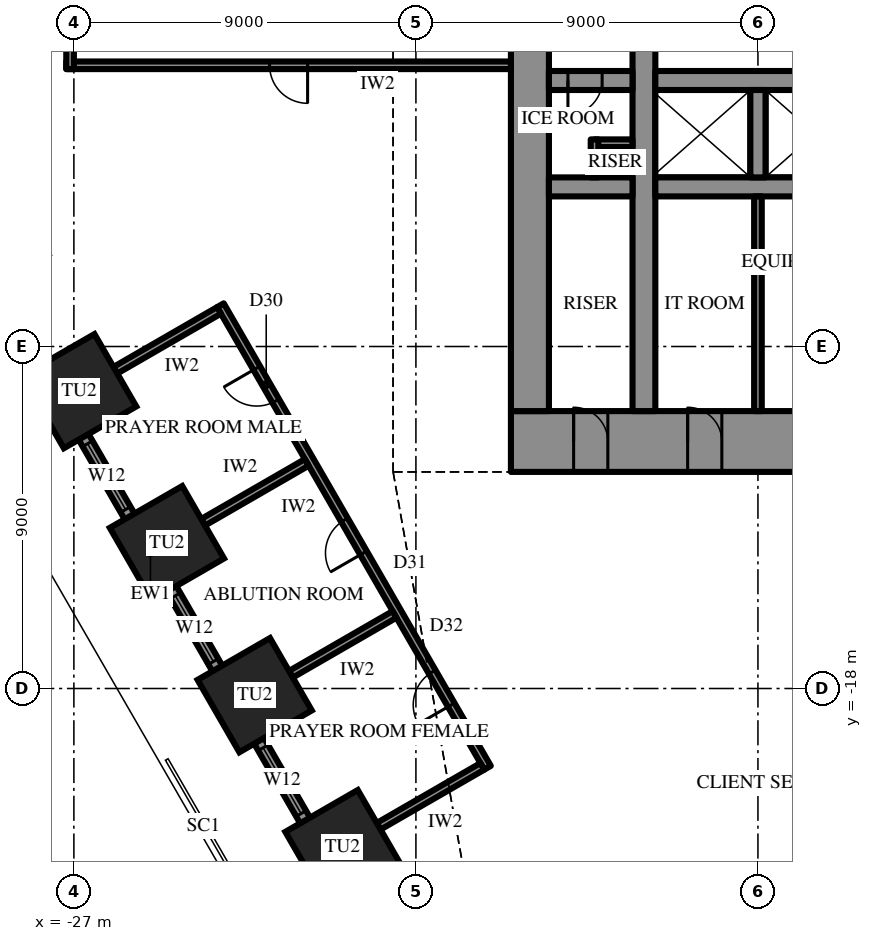
"""IFC4 building model, lengths in metres.
Left out: names, types, materials, properties, quantities, classifications, styles, units other than length and angle.
Written with IfcOpenShell. Run it as: python <this file> out.ifc"""

import sys

from ifc_helpers import new_model, si_unit, direction, frame, frame_2d, origin, origin_2d, place, context, subcontext, project, spatial, rectangle, hollow_rectangle, extrude, element, fill, save


model = new_model("IFC4")
c1 = context("Model", 3, precision=1e-05, world=origin(), true_north=direction((0.0, 1.0)))
c2 = subcontext(c1, "Body", "Model", "MODEL_VIEW")
j1 = project(units=[si_unit("LENGTHUNIT", "METRE"), si_unit("PLANEANGLEUNIT", "RADIAN")], contexts=[c1])
p1 = place(None, origin())
s1 = spatial("IfcSite", under=j1, at=p1, CompositionType="ELEMENT")
p2 = place(p1, origin())
s2 = spatial("IfcBuilding", under=s1, at=p2, CompositionType="ELEMENT")
p3 = place(p2, frame((0.0, 0.0, 215.5)))
s3 = spatial("IfcBuildingStorey", under=s2, at=p3, CompositionType="ELEMENT", Elevation=215.5)
for number, where, z_axis, x_axis in (
    (1, (-26.861, -10.175, 0.0), (0.0, 0.0, 1.0), (0.5, -0.866, 0.0)),
    (2, (-24.552, -14.175, 0.0), (0.0, 0.0, 1.0), (0.5, -0.866, 0.0)),
    (3, (-22.242, -18.175, 0.0), (0.0, 0.0, 1.0), (0.5, -0.866, 0.0)),
    (4, (-19.933, -22.175, 0.0), (0.0, 0.0, 1.0), (0.5, -0.866, 0.0)),
):
    element("IfcColumn", number, at=place(p3, frame(where, z_axis=z_axis, x_axis=x_axis)), inside=s3, PredefinedType="COLUMN", context=c2, shape_type="SweptSolid", body=[
        extrude(hollow_rectangle(XDim=2.2, YDim=2.2, WallThickness=0.12, at=origin_2d()), origin(), (0.0, 0.0, 1.0), 4.2),
    ])
p4 = place(p3, frame((15.5, -11.5, 0.0), z_axis=(0.0, 0.0, 1.0), x_axis=(-1.0, 0.0, 0.0)))
e5 = element("IfcWall", 5, at=p4, inside=s3, PredefinedType="SHEAR", context=c2, shape_type="SweptSolid", body=[
    extrude(rectangle(XDim=31.0, YDim=1.6, at=frame_2d((15.5, 0.0))), origin(), (0.0, 0.0, 1.0), 4.2),
])
p5 = place(p4, frame((16.35, 0.0, 0.0)))
e6 = element("IfcOpeningElement", 6, at=p5, cuts=e5, PredefinedType="OPENING", context=c2, shape_type="SweptSolid", body=[
    extrude(rectangle(XDim=0.9, YDim=2.2, at=frame_2d((0.45, 1.1))), frame((0.0, 0.81, 0.0), z_axis=(0.0, -1.0, 0.0), x_axis=(1.0, 0.0, 0.0)), (0.0, 0.0, 1.0), 1.62),
])
p6 = place(p4, frame((19.35, 0.0, 0.0)))
e7 = element("IfcOpeningElement", 7, at=p6, cuts=e5, PredefinedType="OPENING", context=c2, shape_type="SweptSolid", body=[
    extrude(rectangle(XDim=0.9, YDim=2.2, at=frame_2d((0.45, 1.1))), frame((0.0, 0.81, 0.0), z_axis=(0.0, -1.0, 0.0), x_axis=(1.0, 0.0, 0.0)), (0.0, 0.0, 1.0), 1.62),
])
p7 = place(p4, frame((22.4, 0.0, 0.0)))
e8 = element("IfcOpeningElement", 8, at=p7, cuts=e5, PredefinedType="OPENING", context=c2, shape_type="SweptSolid", body=[
    extrude(rectangle(XDim=1.0, YDim=2.2, at=frame_2d((0.5, 1.1))), frame((0.0, 0.81, 0.0), z_axis=(0.0, -1.0, 0.0), x_axis=(1.0, 0.0, 0.0)), (0.0, 0.0, 1.0), 1.62),
])
p8 = place(p4, frame((1.65, 0.0, 0.0)))
e9 = element("IfcOpeningElement", 9, at=p8, cuts=e5, PredefinedType="OPENING", context=c2, shape_type="SweptSolid", body=[
    extrude(rectangle(XDim=0.9, YDim=2.2, at=frame_2d((0.45, 1.1))), frame((0.0, 0.81, 0.0), z_axis=(0.0, -1.0, 0.0), x_axis=(1.0, 0.0, 0.0)), (0.0, 0.0, 1.0), 1.62),
])
p9 = place(p4, frame((4.65, 0.0, 0.0)))
e10 = element("IfcOpeningElement", 10, at=p9, cuts=e5, PredefinedType="OPENING", context=c2, shape_type="SweptSolid", body=[
    extrude(rectangle(XDim=0.9, YDim=2.2, at=frame_2d((0.45, 1.1))), frame((0.0, 0.81, 0.0), z_axis=(0.0, -1.0, 0.0), x_axis=(1.0, 0.0, 0.0)), (0.0, 0.0, 1.0), 1.62),
])
p10 = place(p4, frame((25.45, 0.0, 0.0)))
e11 = element("IfcOpeningElement", 11, at=p10, cuts=e5, PredefinedType="OPENING", context=c2, shape_type="SweptSolid", body=[
    extrude(rectangle(XDim=0.9, YDim=2.2, at=frame_2d((0.45, 1.1))), frame((0.0, 0.81, 0.0), z_axis=(0.0, -1.0, 0.0), x_axis=(1.0, 0.0, 0.0)), (0.0, 0.0, 1.0), 1.62),
])
p11 = place(p4, frame((28.45, 0.0, 0.0)))
e12 = element("IfcOpeningElement", 12, at=p11, cuts=e5, PredefinedType="OPENING", context=c2, shape_type="SweptSolid", body=[
    extrude(rectangle(XDim=0.9, YDim=2.2, at=frame_2d((0.45, 1.1))), frame((0.0, 0.81, 0.0), z_axis=(0.0, -1.0, 0.0), x_axis=(1.0, 0.0, 0.0)), (0.0, 0.0, 1.0), 1.62),
])
p12 = place(p3, frame((-15.0, 10.7, 0.0), z_axis=(0.0, 0.0, 1.0), x_axis=(0.0, -1.0, 0.0)))
e13 = element("IfcWall", 13, at=p12, inside=s3, PredefinedType="SHEAR", context=c2, shape_type="SweptSolid", body=[
    extrude(rectangle(XDim=21.4, YDim=1.0, at=frame_2d((10.7, 0.0))), origin(), (0.0, 0.0, 1.0), 4.2),
])
p13 = place(p12, frame((9.8, 0.0, 0.0)))
e14 = element("IfcOpeningElement", 14, at=p13, cuts=e13, PredefinedType="OPENING", context=c2, shape_type="SweptSolid", body=[
    extrude(rectangle(XDim=1.8, YDim=2.4, at=frame_2d((0.9, 1.2))), frame((0.0, 0.51, 0.0), z_axis=(0.0, -1.0, 0.0), x_axis=(1.0, 0.0, 0.0)), (0.0, 0.0, 1.0), 1.02),
])
p14 = place(p3, frame((-12.0, -10.7, 0.0), z_axis=(0.0, 0.0, 1.0), x_axis=(0.0, 1.0, 0.0)))
e15 = element("IfcWall", 15, at=p14, inside=s3, PredefinedType="SHEAR", context=c2, shape_type="SweptSolid", body=[
    extrude(rectangle(XDim=21.4, YDim=0.6, at=frame_2d((10.7, 0.0))), origin(), (0.0, 0.0, 1.0), 4.2),
])
p15 = place(p14, frame((9.8, 0.0, 0.0)))
e16 = element("IfcOpeningElement", 16, at=p15, cuts=e15, PredefinedType="OPENING", context=c2, shape_type="SweptSolid", body=[
    extrude(rectangle(XDim=1.8, YDim=2.4, at=frame_2d((0.9, 1.2))), frame((0.0, 0.31, 0.0), z_axis=(0.0, -1.0, 0.0), x_axis=(1.0, 0.0, 0.0)), (0.0, 0.0, 1.0), 0.62),
])
p16 = place(p3, frame((3.2, -2.0, 0.0), z_axis=(0.0, 0.0, 1.0), x_axis=(-1.0, 0.0, 0.0)))
e17 = element("IfcWall", 17, at=p16, inside=s3, PredefinedType="SHEAR", context=c2, shape_type="SweptSolid", body=[
    extrude(rectangle(XDim=14.9, YDim=0.5, at=frame_2d((7.45, 0.0))), origin(), (0.0, 0.0, 1.0), 4.2),
])
p17 = place(p16, frame((1.15, 0.0, 0.0)))
e18 = element("IfcOpeningElement", 18, at=p17, cuts=e17, PredefinedType="OPENING", context=c2, shape_type="SweptSolid", body=[
    extrude(rectangle(XDim=1.1, YDim=2.2, at=frame_2d((0.55, 1.1))), frame((0.0, 0.26, 0.0), z_axis=(0.0, -1.0, 0.0), x_axis=(1.0, 0.0, 0.0)), (0.0, 0.0, 1.0), 0.52),
])
p18 = place(p16, frame((4.15, 0.0, 0.0)))
e19 = element("IfcOpeningElement", 19, at=p18, cuts=e17, PredefinedType="OPENING", context=c2, shape_type="SweptSolid", body=[
    extrude(rectangle(XDim=1.1, YDim=2.2, at=frame_2d((0.55, 1.1))), frame((0.0, 0.26, 0.0), z_axis=(0.0, -1.0, 0.0), x_axis=(1.0, 0.0, 0.0)), (0.0, 0.0, 1.0), 0.52),
])
p19 = place(p16, frame((7.15, 0.0, 0.0)))
e20 = element("IfcOpeningElement", 20, at=p19, cuts=e17, PredefinedType="OPENING", context=c2, shape_type="SweptSolid", body=[
    extrude(rectangle(XDim=1.1, YDim=2.2, at=frame_2d((0.55, 1.1))), frame((0.0, 0.26, 0.0), z_axis=(0.0, -1.0, 0.0), x_axis=(1.0, 0.0, 0.0)), (0.0, 0.0, 1.0), 0.52),
])
p20 = place(p16, frame((10.15, 0.0, 0.0)))
e21 = element("IfcOpeningElement", 21, at=p20, cuts=e17, PredefinedType="OPENING", context=c2, shape_type="SweptSolid", body=[
    extrude(rectangle(XDim=1.1, YDim=2.2, at=frame_2d((0.55, 1.1))), frame((0.0, 0.26, 0.0), z_axis=(0.0, -1.0, 0.0), x_axis=(1.0, 0.0, 0.0)), (0.0, 0.0, 1.0), 0.52),
])
p21 = place(p3, frame((-12.3, -2.0, 0.0), z_axis=(0.0, 0.0, 1.0), x_axis=(-1.0, 0.0, 0.0)))
e22 = element("IfcWall", 22, at=p21, inside=s3, PredefinedType="SHEAR", context=c2, shape_type="SweptSolid", body=[
    extrude(rectangle(XDim=2.2, YDim=0.5, at=frame_2d((1.1, 0.0))), origin(), (0.0, 0.0, 1.0), 4.2),
])
p22 = place(p21, frame((0.8, 0.0, 0.0)))
e23 = element("IfcOpeningElement", 23, at=p22, cuts=e22, PredefinedType="OPENING", context=c2, shape_type="SweptSolid", body=[
    extrude(rectangle(XDim=0.9, YDim=2.2, at=frame_2d((0.45, 1.1))), frame((0.0, 0.26, 0.0), z_axis=(0.0, -1.0, 0.0), x_axis=(1.0, 0.0, 0.0)), (0.0, 0.0, 1.0), 0.52),
])
p23 = place(p3, frame((11.7, -4.8, 0.0), z_axis=(0.0, 0.0, 1.0), x_axis=(-1.0, 0.0, 0.0)))
e24 = element("IfcWall", 24, at=p23, inside=s3, PredefinedType="SHEAR", context=c2, shape_type="SweptSolid", body=[
    extrude(rectangle(XDim=23.4, YDim=0.5, at=frame_2d((11.7, 0.0))), origin(), (0.0, 0.0, 1.0), 4.2),
])
p24 = place(p23, frame((6.6, 0.0, 0.0)))
e25 = element("IfcOpeningElement", 25, at=p24, cuts=e24, PredefinedType="OPENING", context=c2, shape_type="SweptSolid", body=[
    extrude(rectangle(XDim=1.2, YDim=2.2, at=frame_2d((0.6, 1.1))), frame((0.0, 0.26, 0.0), z_axis=(0.0, -1.0, 0.0), x_axis=(1.0, 0.0, 0.0)), (0.0, 0.0, 1.0), 0.52),
])
p25 = place(p23, frame((3.6, 0.0, 0.0)))
e26 = element("IfcOpeningElement", 26, at=p25, cuts=e24, PredefinedType="OPENING", context=c2, shape_type="SweptSolid", body=[
    extrude(rectangle(XDim=1.2, YDim=2.2, at=frame_2d((0.6, 1.1))), frame((0.0, 0.26, 0.0), z_axis=(0.0, -1.0, 0.0), x_axis=(1.0, 0.0, 0.0)), (0.0, 0.0, 1.0), 0.52),
])
p26 = place(p3, frame((-12.3, -4.8, 0.0), z_axis=(0.0, 0.0, 1.0), x_axis=(-1.0, 0.0, 0.0)))
e27 = element("IfcWall", 27, at=p26, inside=s3, PredefinedType="SHEAR", context=c2, shape_type="SweptSolid", body=[
    extrude(rectangle(XDim=2.2, YDim=0.5, at=frame_2d((1.1, 0.0))), origin(), (0.0, 0.0, 1.0), 4.2),
])
p27 = place(p3, frame((-9.0, -2.25, 0.0), z_axis=(0.0, 0.0, 1.0), x_axis=(0.0, -1.0, 0.0)))
e28 = element("IfcWall", 28, at=p27, inside=s3, PredefinedType="SHEAR", context=c2, shape_type="SweptSolid", body=[
    extrude(rectangle(XDim=2.3, YDim=0.4, at=frame_2d((1.15, 0.0))), origin(), (0.0, 0.0, 1.0), 4.2),
])
p28 = place(p3, frame((-31.913, -2.425, 0.0), z_axis=(0.0, 0.0, 1.0), x_axis=(0.500001051461, -0.866024796723, 0.0)))
e29 = element("IfcWall", 29, at=p28, inside=s3, PredefinedType="SOLIDWALL", context=c2, shape_type="SweptSolid", body=[
    extrude(rectangle(XDim=27.713, YDim=0.3, at=frame_2d((13.856, 0.0))), origin(), (0.0, 0.0, 1.0), 2.0),
])
p29 = place(p28, frame((1.309, 0.0, 0.6)))
e30 = element("IfcOpeningElement", 30, at=p29, cuts=e29, PredefinedType="OPENING", context=c2, shape_type="SweptSolid", body=[
    extrude(rectangle(XDim=2.0, YDim=1.15, at=frame_2d((1.0, 0.575))), frame((0.0, 0.16, 0.0), z_axis=(0.0, -1.0, 0.0), x_axis=(1.0, 0.0, 0.0)), (0.0, 0.0, 1.0), 0.32),
])
p30 = place(p28, frame((5.928, 0.0, 0.6)))
e31 = element("IfcOpeningElement", 31, at=p30, cuts=e29, PredefinedType="OPENING", context=c2, shape_type="SweptSolid", body=[
    extrude(rectangle(XDim=2.0, YDim=1.15, at=frame_2d((1.0, 0.575))), frame((0.0, 0.16, 0.0), z_axis=(0.0, -1.0, 0.0), x_axis=(1.0, 0.0, 0.0)), (0.0, 0.0, 1.0), 0.32),
])
p31 = place(p28, frame((10.547, 0.0, 0.6)))
e32 = element("IfcOpeningElement", 32, at=p31, cuts=e29, PredefinedType="OPENING", context=c2, shape_type="SweptSolid", body=[
    extrude(rectangle(XDim=2.0, YDim=1.15, at=frame_2d((1.0, 0.575))), frame((0.0, 0.16, 0.0), z_axis=(0.0, -1.0, 0.0), x_axis=(1.0, 0.0, 0.0)), (0.0, 0.0, 1.0), 0.32),
])
p32 = place(p28, frame((15.166, 0.0, 0.6)))
e33 = element("IfcOpeningElement", 33, at=p32, cuts=e29, PredefinedType="OPENING", context=c2, shape_type="SweptSolid", body=[
    extrude(rectangle(XDim=2.0, YDim=1.15, at=frame_2d((1.0, 0.575))), frame((0.0, 0.16, 0.0), z_axis=(0.0, -1.0, 0.0), x_axis=(1.0, 0.0, 0.0)), (0.0, 0.0, 1.0), 0.32),
])
p33 = place(p28, frame((19.785, 0.0, 0.6)))
e34 = element("IfcOpeningElement", 34, at=p33, cuts=e29, PredefinedType="OPENING", context=c2, shape_type="SweptSolid", body=[
    extrude(rectangle(XDim=2.0, YDim=1.15, at=frame_2d((1.0, 0.575))), frame((0.0, 0.16, 0.0), z_axis=(0.0, -1.0, 0.0), x_axis=(1.0, 0.0, 0.0)), (0.0, 0.0, 1.0), 0.32),
])
p34 = place(p28, frame((24.403, 0.0, 0.6)))
e35 = element("IfcOpeningElement", 35, at=p34, cuts=e29, PredefinedType="OPENING", context=c2, shape_type="SweptSolid", body=[
    extrude(rectangle(XDim=2.0, YDim=1.15, at=frame_2d((1.0, 0.575))), frame((0.0, 0.16, 0.0), z_axis=(0.0, -1.0, 0.0), x_axis=(1.0, 0.0, 0.0)), (0.0, 0.0, 1.0), 0.32),
])
p35 = place(p3, frame((-9.0, -5.05, 0.0), z_axis=(0.0, 0.0, 1.0), x_axis=(0.0, -1.0, 0.0)))
e36 = element("IfcWall", 36, at=p35, inside=s3, PredefinedType="PARTITIONING", context=c2, shape_type="SweptSolid", body=[
    extrude(rectangle(XDim=5.65, YDim=0.2, at=frame_2d((2.825, 0.0))), origin(), (0.0, 0.0, 1.0), 4.0),
])
for number, where, z_axis, x_axis in (
    (37, (-12.3, -3.65, 0.0), (0.0, 0.0, 1.0), (-1.0, 0.0, 0.0)),
    (38, (-13.3, -3.55, 0.0), (0.0, 0.0, 1.0), (0.0, -1.0, 0.0)),
):
    element("IfcWall", number, at=place(p3, frame(where, z_axis=z_axis, x_axis=x_axis)), inside=s3, PredefinedType="PARTITIONING", context=c2, shape_type="SweptSolid", body=[
        extrude(rectangle(XDim=1.0, YDim=0.2, at=frame_2d((0.5, 0.0))), origin(), (0.0, 0.0, 1.0), 4.0),
    ])
p36 = place(p3, frame((-23.144, -7.913, 0.0), z_axis=(0.0, 0.0, 1.0), x_axis=(0.500002095642, -0.866024193862, 0.0)))
e39 = element("IfcWall", 39, at=p36, inside=s3, PredefinedType="PARTITIONING", context=c2, shape_type="SweptSolid", body=[
    extrude(rectangle(XDim=14.057, YDim=0.2, at=frame_2d((7.028, 0.0))), origin(), (0.0, 0.0, 1.0), 4.0),
])
p37 = place(p36, frame((1.909, 0.0, 0.0)))
e40 = element("IfcOpeningElement", 40, at=p37, cuts=e39, PredefinedType="OPENING", context=c2, shape_type="SweptSolid", body=[
    extrude(rectangle(XDim=1.0, YDim=2.2, at=frame_2d((0.5, 1.1))), frame((0.0, 0.11, 0.0), z_axis=(0.0, -1.0, 0.0), x_axis=(1.0, 0.0, 0.0)), (0.0, 0.0, 1.0), 0.22),
])
p38 = place(p36, frame((6.528, 0.0, 0.0)))
e41 = element("IfcOpeningElement", 41, at=p38, cuts=e39, PredefinedType="OPENING", context=c2, shape_type="SweptSolid", body=[
    extrude(rectangle(XDim=1.0, YDim=2.2, at=frame_2d((0.5, 1.1))), frame((0.0, 0.11, 0.0), z_axis=(0.0, -1.0, 0.0), x_axis=(1.0, 0.0, 0.0)), (0.0, 0.0, 1.0), 0.22),
])
p39 = place(p36, frame((11.147, 0.0, 0.0)))
e42 = element("IfcOpeningElement", 42, at=p39, cuts=e39, PredefinedType="OPENING", context=c2, shape_type="SweptSolid", body=[
    extrude(rectangle(XDim=1.0, YDim=2.2, at=frame_2d((0.5, 1.1))), frame((0.0, 0.11, 0.0), z_axis=(0.0, -1.0, 0.0), x_axis=(1.0, 0.0, 0.0)), (0.0, 0.0, 1.0), 0.22),
])
for number, where, z_axis, x_axis in (
    (43, (-23.181, -8.05, 0.0), (0.0, 0.0, 1.0), (-0.866, -0.5, 0.0)),
    (44, (-20.871, -12.05, 0.0), (0.0, 0.0, 1.0), (-0.866, -0.5, 0.0)),
    (45, (-18.562, -16.05, 0.0), (0.0, 0.0, 1.0), (-0.866, -0.5, 0.0)),
    (46, (-16.252, -20.05, 0.0), (0.0, 0.0, 1.0), (-0.866, -0.5, 0.0)),
):
    element("IfcWall", number, at=place(p3, frame(where, z_axis=z_axis, x_axis=x_axis)), inside=s3, PredefinedType="PARTITIONING", context=c2, shape_type="SweptSolid", body=[
        extrude(rectangle(XDim=3.15, YDim=0.2, at=frame_2d((1.575, 0.0))), origin(), (0.0, 0.0, 1.0), 3.082),
    ])
p40 = place(p3, frame((-15.5, -1.6, 0.0), z_axis=(0.0, 0.0, 1.0), x_axis=(-1.0, 0.0, 0.0)))
e47 = element("IfcWall", 47, at=p40, inside=s3, PredefinedType="PARTITIONING", context=c2, shape_type="SweptSolid", body=[
    extrude(rectangle(XDim=11.7, YDim=0.2, at=frame_2d((5.85, 0.0))), origin(), (0.0, 0.0, 1.0), 4.0),
])
p41 = place(p40, frame((5.35, 0.0, 0.0)))
e48 = element("IfcOpeningElement", 48, at=p41, cuts=e47, PredefinedType="OPENING", context=c2, shape_type="SweptSolid", body=[
    extrude(rectangle(XDim=1.0, YDim=2.2, at=frame_2d((0.5, 1.1))), frame((0.0, 0.11, 0.0), z_axis=(0.0, -1.0, 0.0), x_axis=(1.0, 0.0, 0.0)), (0.0, 0.0, 1.0), 0.22),
])
p42 = place(p3, frame((-27.1, -1.7, 0.0), z_axis=(0.0, 0.0, 1.0), x_axis=(0.0, 1.0, 0.0)))
e49 = element("IfcWall", 49, at=p42, inside=s3, PredefinedType="PARTITIONING", context=c2, shape_type="SweptSolid", body=[
    extrude(rectangle(XDim=3.4, YDim=0.2, at=frame_2d((1.7, 0.0))), origin(), (0.0, 0.0, 1.0), 4.0),
])
p43 = place(p42, frame((1.2, 0.0, 0.0)))
e50 = element("IfcOpeningElement", 50, at=p43, cuts=e49, PredefinedType="OPENING", context=c2, shape_type="SweptSolid", body=[
    extrude(rectangle(XDim=1.0, YDim=2.2, at=frame_2d((0.5, 1.1))), frame((0.0, 0.11, 0.0), z_axis=(0.0, -1.0, 0.0), x_axis=(1.0, 0.0, 0.0)), (0.0, 0.0, 1.0), 0.22),
])
p44 = place(p31, origin())
e51 = element("IfcWindow", 51, at=p44, inside=s3, PartitioningType="SINGLE_PANEL", PredefinedType="WINDOW", context=c2, shape_type="SweptSolid", body=[
    extrude(rectangle(XDim=2.0, YDim=1.15, at=frame_2d((1.0, 0.575))), frame((0.0, 0.03, 0.0), z_axis=(0.0, -1.0, 0.0), x_axis=(1.0, 0.0, 0.0)), (0.0, 0.0, 1.0), 0.06),
])
fill(e32, e51)
p45 = place(p32, origin())
e52 = element("IfcWindow", 52, at=p45, inside=s3, PartitioningType="SINGLE_PANEL", PredefinedType="WINDOW", context=c2, shape_type="SweptSolid", body=[
    extrude(rectangle(XDim=2.0, YDim=1.15, at=frame_2d((1.0, 0.575))), frame((0.0, 0.03, 0.0), z_axis=(0.0, -1.0, 0.0), x_axis=(1.0, 0.0, 0.0)), (0.0, 0.0, 1.0), 0.06),
])
fill(e33, e52)
p46 = place(p33, origin())
e53 = element("IfcWindow", 53, at=p46, inside=s3, PartitioningType="SINGLE_PANEL", PredefinedType="WINDOW", context=c2, shape_type="SweptSolid", body=[
    extrude(rectangle(XDim=2.0, YDim=1.15, at=frame_2d((1.0, 0.575))), frame((0.0, 0.03, 0.0), z_axis=(0.0, -1.0, 0.0), x_axis=(1.0, 0.0, 0.0)), (0.0, 0.0, 1.0), 0.06),
])
fill(e34, e53)
p47 = place(p10, frame((0.9, 0.0, 0.0), z_axis=(0.0, 0.0, 1.0), x_axis=(-1.0, 0.0, 0.0)))
e54 = element("IfcDoor", 54, at=p47, inside=s3, OperationType="SINGLE_SWING_RIGHT", PredefinedType="DOOR", context=c2, shape_type="SweptSolid", body=[
    extrude(rectangle(XDim=0.9, YDim=2.2, at=frame_2d((0.45, 1.1))), frame((0.0, 0.025, 0.0), z_axis=(0.0, -1.0, 0.0), x_axis=(1.0, 0.0, 0.0)), (0.0, 0.0, 1.0), 0.05),
])
fill(e11, e54)
p48 = place(p11, frame((0.9, 0.0, 0.0), z_axis=(0.0, 0.0, 1.0), x_axis=(-1.0, 0.0, 0.0)))
e55 = element("IfcDoor", 55, at=p48, inside=s3, OperationType="SINGLE_SWING_RIGHT", PredefinedType="DOOR", context=c2, shape_type="SweptSolid", body=[
    extrude(rectangle(XDim=0.9, YDim=2.2, at=frame_2d((0.45, 1.1))), frame((0.0, 0.025, 0.0), z_axis=(0.0, -1.0, 0.0), x_axis=(1.0, 0.0, 0.0)), (0.0, 0.0, 1.0), 0.05),
])
fill(e12, e55)
p49 = place(p22, origin())
e56 = element("IfcDoor", 56, at=p49, inside=s3, OperationType="SINGLE_SWING_LEFT", PredefinedType="DOOR", context=c2, shape_type="SweptSolid", body=[
    extrude(rectangle(XDim=0.9, YDim=2.2, at=frame_2d((0.45, 1.1))), frame((0.0, 0.025, 0.0), z_axis=(0.0, -1.0, 0.0), x_axis=(1.0, 0.0, 0.0)), (0.0, 0.0, 1.0), 0.05),
])
fill(e23, e56)
p50 = place(p37, frame((1.0, 0.0, 0.0), z_axis=(0.0, 0.0, 1.0), x_axis=(-1.0, 0.0, 0.0)))
e57 = element("IfcDoor", 57, at=p50, inside=s3, OperationType="SINGLE_SWING_LEFT", PredefinedType="DOOR", context=c2, shape_type="SweptSolid", body=[
    extrude(rectangle(XDim=1.0, YDim=2.2, at=frame_2d((0.5, 1.1))), frame((0.0, 0.025, 0.0), z_axis=(0.0, -1.0, 0.0), x_axis=(1.0, 0.0, 0.0)), (0.0, 0.0, 1.0), 0.05),
])
fill(e40, e57)
p51 = place(p38, frame((1.0, 0.0, 0.0), z_axis=(0.0, 0.0, 1.0), x_axis=(-1.0, 0.0, 0.0)))
e58 = element("IfcDoor", 58, at=p51, inside=s3, OperationType="SINGLE_SWING_RIGHT", PredefinedType="DOOR", context=c2, shape_type="SweptSolid", body=[
    extrude(rectangle(XDim=1.0, YDim=2.2, at=frame_2d((0.5, 1.1))), frame((0.0, 0.025, 0.0), z_axis=(0.0, -1.0, 0.0), x_axis=(1.0, 0.0, 0.0)), (0.0, 0.0, 1.0), 0.05),
])
fill(e41, e58)
p52 = place(p39, frame((1.0, 0.0, 0.0), z_axis=(0.0, 0.0, 1.0), x_axis=(-1.0, 0.0, 0.0)))
e59 = element("IfcDoor", 59, at=p52, inside=s3, OperationType="SINGLE_SWING_RIGHT", PredefinedType="DOOR", context=c2, shape_type="SweptSolid", body=[
    extrude(rectangle(XDim=1.0, YDim=2.2, at=frame_2d((0.5, 1.1))), frame((0.0, 0.025, 0.0), z_axis=(0.0, -1.0, 0.0), x_axis=(1.0, 0.0, 0.0)), (0.0, 0.0, 1.0), 0.05),
])
fill(e42, e59)
p53 = place(p41, origin())
e60 = element("IfcDoor", 60, at=p53, inside=s3, OperationType="SINGLE_SWING_RIGHT", PredefinedType="DOOR", context=c2, shape_type="SweptSolid", body=[
    extrude(rectangle(XDim=1.0, YDim=2.2, at=frame_2d((0.5, 1.1))), frame((0.0, 0.025, 0.0), z_axis=(0.0, -1.0, 0.0), x_axis=(1.0, 0.0, 0.0)), (0.0, 0.0, 1.0), 0.05),
])
fill(e48, e60)
save(model, sys.argv[1])
